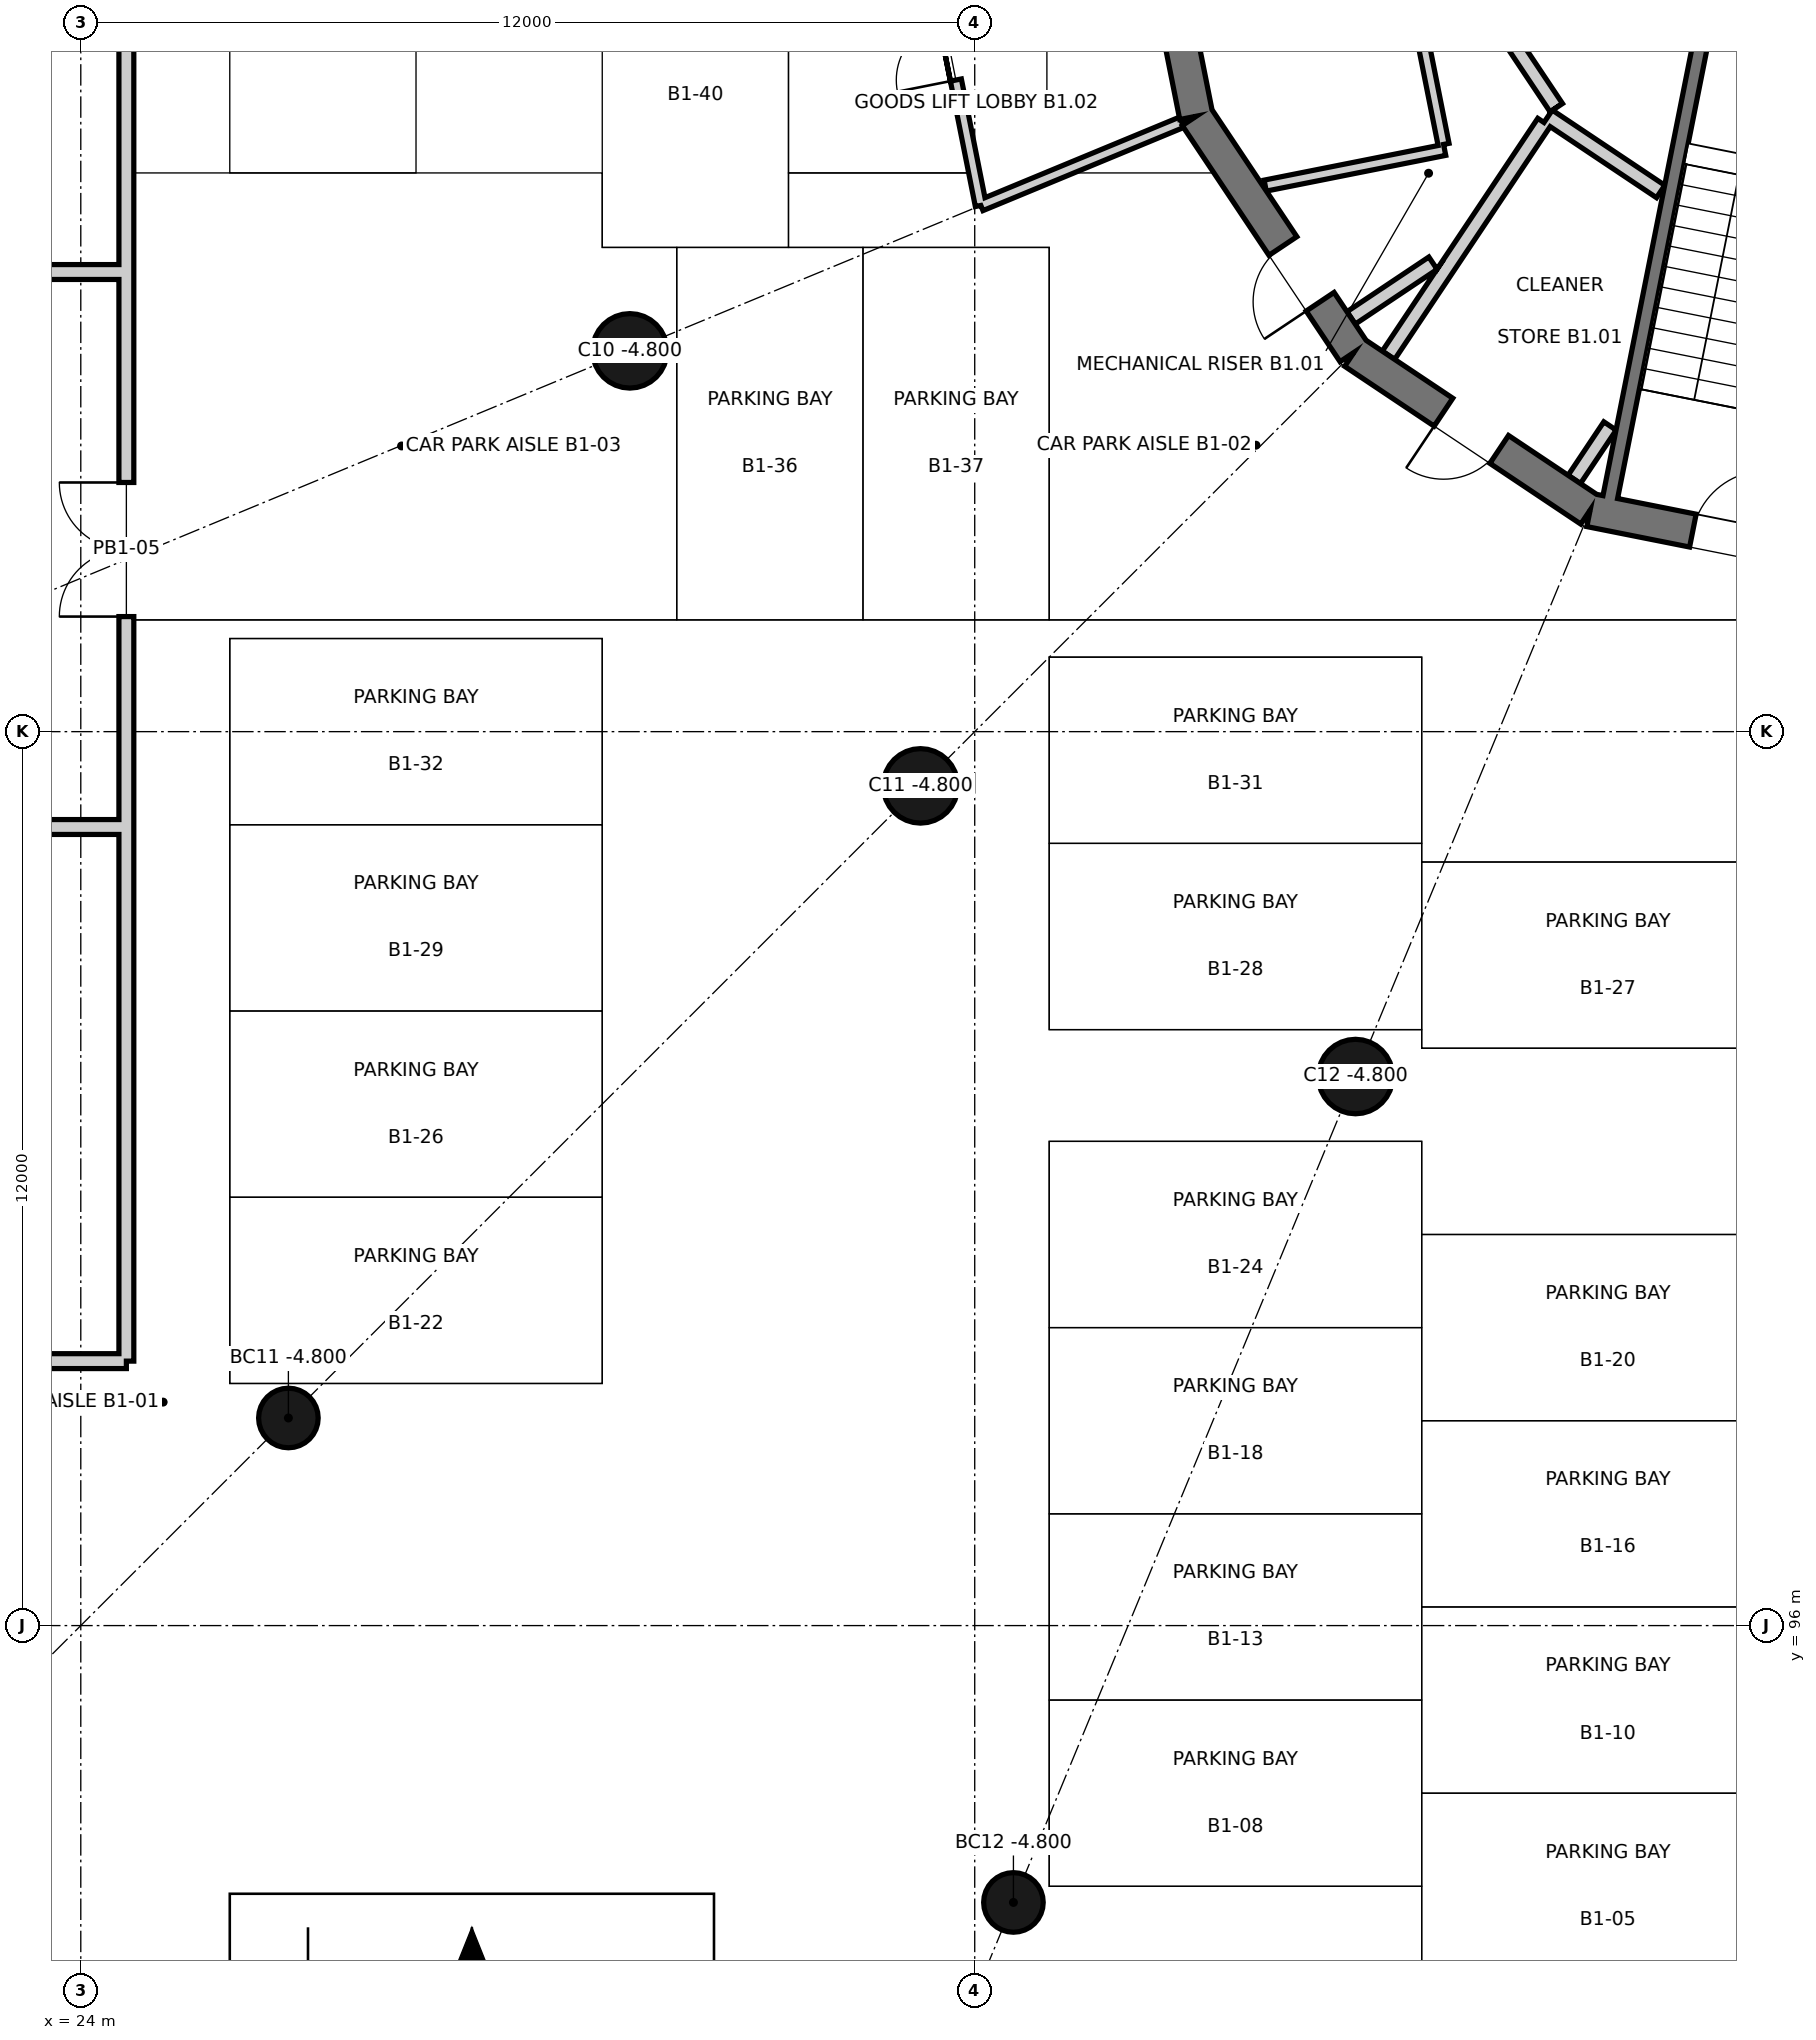
"""IFC4 building model, lengths in metres.
Left out: names, types, materials, properties, quantities, classifications, styles, units other than length and angle.
Written with IfcOpenShell. Run it as: python <this file> out.ifc"""

import sys

from ifc_helpers import new_model, si_unit, direction, frame, frame_2d, origin, origin_2d, place, context, subcontext, project, spatial, polyline, rectangle, circle, outline, extrude, element, fill, save


model = new_model("IFC4")
c1 = context("Model", 3, precision=1e-05, world=origin(), true_north=direction((0.0, 1.0)))
c2 = subcontext(c1, "Body", "Model", "MODEL_VIEW")
j1 = project(units=[si_unit("LENGTHUNIT", "METRE"), si_unit("PLANEANGLEUNIT", "RADIAN")], contexts=[c1])
p1 = place(None, origin())
s1 = spatial("IfcSite", under=j1, at=p1, CompositionType="ELEMENT")
p2 = place(p1, origin())
s2 = spatial("IfcBuilding", under=s1, at=p2, CompositionType="ELEMENT")
p3 = place(p2, frame((0.0, 0.0, -4.2)))
s3 = spatial("IfcBuildingStorey", under=s2, at=p3, CompositionType="ELEMENT", Elevation=-4.2)
p4 = place(p3, frame((38.229, 120.0, -0.6), z_axis=(0.0, 0.0, 1.0), x_axis=(0.195069197673, -0.98078948206, 0.0)))
e1 = element("IfcWall", 1, at=p4, inside=s3, PredefinedType="SHEAR", context=c2, shape_type="SweptSolid", body=[
    extrude(outline(polyline([(-0.045, -0.225), (3.857, -0.225), (3.768, 0.225), (0.045, 0.225), (-0.045, -0.225)])), origin(), (0.0, 0.0, 1.0), 4.8),
])
p5 = place(p4, frame((1.095, 0.0, 0.6)))
e2 = element("IfcOpeningElement", 2, at=p5, cuts=e1, PredefinedType="OPENING", context=c2, shape_type="SweptSolid", body=[
    extrude(rectangle(XDim=1.6, YDim=2.1, at=frame_2d((0.8, 1.05))), frame((0.0, 0.235, 0.0), z_axis=(0.0, -1.0, 0.0), x_axis=(1.0, 0.0, 0.0)), (0.0, 0.0, 1.0), 0.47),
])
p6 = place(p3, frame((38.973, 116.261, -0.6), z_axis=(0.0, 0.0, 1.0), x_axis=(0.555542277102, -0.83148829117, 0.0)))
e3 = element("IfcWall", 3, at=p6, inside=s3, PredefinedType="SHEAR", context=c2, shape_type="SweptSolid", body=[
    extrude(outline(polyline([(-0.045, -0.225), (3.857, -0.225), (3.768, 0.225), (0.045, 0.225), (-0.045, -0.225)])), origin(), (0.0, 0.0, 1.0), 4.8),
])
p7 = place(p6, frame((2.095, 0.0, 0.6)))
e4 = element("IfcOpeningElement", 4, at=p7, cuts=e3, PredefinedType="OPENING", context=c2, shape_type="SweptSolid", body=[
    extrude(rectangle(XDim=0.9, YDim=2.1, at=frame_2d((0.45, 1.05))), frame((0.0, 0.235, 0.0), z_axis=(0.0, -1.0, 0.0), x_axis=(1.0, 0.0, 0.0)), (0.0, 0.0, 1.0), 0.47),
])
p8 = place(p3, frame((41.091, 113.091, -0.6), z_axis=(0.0, 0.0, 1.0), x_axis=(0.83148829117, -0.555542277102, 0.0)))
e5 = element("IfcWall", 5, at=p8, inside=s3, PredefinedType="SHEAR", context=c2, shape_type="SweptSolid", body=[
    extrude(outline(polyline([(-0.045, -0.225), (3.857, -0.225), (3.768, 0.225), (0.045, 0.225), (-0.045, -0.225)])), origin(), (0.0, 0.0, 1.0), 4.8),
])
p9 = place(p8, frame((1.445, 0.0, 0.6)))
e6 = element("IfcOpeningElement", 6, at=p9, cuts=e5, PredefinedType="OPENING", context=c2, shape_type="SweptSolid", body=[
    extrude(rectangle(XDim=0.9, YDim=2.1, at=frame_2d((0.45, 1.05))), frame((0.0, 0.235, 0.0), z_axis=(0.0, -1.0, 0.0), x_axis=(1.0, 0.0, 0.0)), (0.0, 0.0, 1.0), 0.47),
])
p10 = place(p3, frame((44.261, 110.973, -0.6), z_axis=(0.0, 0.0, 1.0), x_axis=(0.98078948206, -0.195069197673, 0.0)))
e7 = element("IfcWall", 7, at=p10, inside=s3, PredefinedType="SHEAR", context=c2, shape_type="SweptSolid", body=[
    extrude(outline(polyline([(-0.045, -0.225), (3.857, -0.225), (3.768, 0.225), (0.045, 0.225), (-0.045, -0.225)])), origin(), (0.0, 0.0, 1.0), 4.8),
])
p11 = place(p10, frame((1.406, 0.0, 0.6)))
e8 = element("IfcOpeningElement", 8, at=p11, cuts=e7, PredefinedType="OPENING", context=c2, shape_type="SweptSolid", body=[
    extrude(rectangle(XDim=1.0, YDim=2.1, at=frame_2d((0.5, 1.05))), frame((0.0, 0.235, 0.0), z_axis=(0.0, -1.0, 0.0), x_axis=(1.0, 0.0, 0.0)), (0.0, 0.0, 1.0), 0.47),
])
p12 = place(p3, frame((46.053, 118.799, -0.6), z_axis=(0.0, 0.0, 1.0), x_axis=(-0.195092759861, -0.980784795483, 0.0)))
e9 = element("IfcWall", 9, at=p12, inside=s3, PredefinedType="SHEAR", context=c2, shape_type="SweptSolid", body=[
    extrude(rectangle(XDim=7.8, YDim=0.2, at=frame_2d((3.9, 0.0))), origin(), (0.0, 0.0, 1.0), 4.8),
])
for number, where, z_axis, x_axis in (
    (10, (31.37, 113.112, -0.6), (0.0, 0.0, 1.0), (1.0, 0.0, 0.0)),
    (11, (35.272, 107.272, -0.6), (0.0, 0.0, 1.0), (1.0, 0.0, 0.0)),
    (12, (41.112, 103.37, -0.6), (0.0, 0.0, 1.0), (1.0, 0.0, 0.0)),
):
    element("IfcColumn", number, at=place(p3, frame(where, z_axis=z_axis, x_axis=x_axis)), inside=s3, PredefinedType="COLUMN", context=c2, shape_type="SweptSolid", body=[
        extrude(circle(Radius=0.5, at=origin_2d()), origin(), (0.0, 0.0, 1.0), 4.8),
    ])
for number, where, z_axis, x_axis in (
    (13, (26.787, 98.787, -0.6), (0.0, 0.0, 1.0), (1.0, 0.0, 0.0)),
    (14, (36.52, 92.284, -0.6), (0.0, 0.0, 1.0), (1.0, 0.0, 0.0)),
):
    element("IfcColumn", number, at=place(p3, frame(where, z_axis=z_axis, x_axis=x_axis)), inside=s3, PredefinedType="COLUMN", context=c2, shape_type="SweptSolid", body=[
        extrude(circle(Radius=0.4, at=origin_2d()), origin(), (0.0, 0.0, 1.0), 4.35),
    ])
p13 = place(p3, frame((39.899, 115.33, 0.0), z_axis=(0.0, 0.0, 1.0), x_axis=(0.980782755583, 0.195103014715, 0.0)))
e15 = element("IfcWall", 15, at=p13, inside=s3, PredefinedType="PARTITIONING", context=c2, shape_type="SweptSolid", body=[
    extrude(rectangle(XDim=2.456, YDim=0.15, at=frame_2d((1.228, 0.0))), origin(), (0.0, 0.0, 1.0), 3.85),
])
p14 = place(p3, frame((42.294, 115.883, 0.0), z_axis=(0.0, 0.0, 1.0), x_axis=(-0.195163043227, 0.980770812452, 0.0)))
e16 = element("IfcWall", 16, at=p14, inside=s3, PredefinedType="PARTITIONING", context=c2, shape_type="SweptSolid", body=[
    extrude(rectangle(XDim=1.675, YDim=0.15, at=frame_2d((0.837, 0.0))), origin(), (0.0, 0.0, 1.0), 3.85),
])
p15 = place(p3, frame((43.697, 116.26, 0.0), z_axis=(0.0, 0.0, 1.0), x_axis=(0.831408849916, -0.555661159593, 0.0)))
e17 = element("IfcWall", 17, at=p15, inside=s3, PredefinedType="SOLIDWALL", context=c2, shape_type="SweptSolid", body=[
    extrude(rectangle(XDim=1.817, YDim=0.2, at=frame_2d((0.908, 0.0))), origin(), (0.0, 0.0, 1.0), 3.85),
])
p16 = place(p3, frame((44.528, 112.104, 0.0), z_axis=(0.0, 0.0, 1.0), x_axis=(-0.55561384329, -0.831440471197, 0.0)))
e18 = element("IfcWall", 18, at=p16, inside=s3, PredefinedType="SOLIDWALL", context=c2, shape_type="SweptSolid", body=[
    extrude(rectangle(XDim=0.863, YDim=0.2, at=frame_2d((0.432, 0.0))), origin(), (0.0, 0.0, 1.0), 3.85),
])
p17 = place(p3, frame((41.554, 113.052, 0.0), z_axis=(0.0, 0.0, 1.0), x_axis=(0.555524492638, 0.831500173228, 0.0)))
e19 = element("IfcWall", 19, at=p17, inside=s3, PredefinedType="SOLIDWALL", context=c2, shape_type="SweptSolid", body=[
    extrude(rectangle(XDim=3.758, YDim=0.2, at=frame_2d((1.879, 0.0))), origin(), (0.0, 0.0, 1.0), 3.85),
])
p18 = place(p3, frame((43.157, 117.348, 0.0), z_axis=(0.0, 0.0, 1.0), x_axis=(0.555615365777, -0.831439453786, 0.0)))
e20 = element("IfcWall", 20, at=p18, inside=s3, PredefinedType="SOLIDWALL", context=c2, shape_type="SweptSolid", body=[
    extrude(rectangle(XDim=1.169, YDim=0.2, at=frame_2d((0.584, 0.0))), origin(), (0.0, 0.0, 1.0), 3.85),
])
p19 = place(p3, frame((42.152, 114.288, 0.0), z_axis=(0.0, 0.0, 1.0), x_axis=(-0.83148157585, -0.555552327889, 0.0)))
e21 = element("IfcWall", 21, at=p19, inside=s3, PredefinedType="SOLIDWALL", context=c2, shape_type="SweptSolid", body=[
    extrude(rectangle(XDim=1.322, YDim=0.2, at=frame_2d((0.661, 0.0))), origin(), (0.0, 0.0, 1.0), 3.85),
])
p20 = place(p3, frame((24.517, 114.17, 0.0), z_axis=(0.0, 0.0, 1.0), x_axis=(-1.0, 0.0, 0.0)))
e22 = element("IfcWall", 22, at=p20, inside=s3, PredefinedType="SOLIDWALL", context=c2, shape_type="SweptSolid", body=[
    extrude(rectangle(XDim=16.765, YDim=0.2, at=frame_2d((8.383, 0.0))), origin(), (0.0, 0.0, 1.0), 3.75),
])
p21 = place(p3, frame((24.612, 128.05, 0.0), z_axis=(0.0, 0.0, 1.0), x_axis=(0.0, -1.0, 0.0)))
e23 = element("IfcWall", 23, at=p21, inside=s3, PredefinedType="SOLIDWALL", context=c2, shape_type="SweptSolid", body=[
    extrude(rectangle(XDim=13.88, YDim=0.2, at=frame_2d((6.94, 0.0))), origin(), (0.0, 0.0, 1.0), 3.75),
])
p22 = place(p21, frame((6.04, 0.0, 0.0)))
e24 = element("IfcOpeningElement", 24, at=p22, cuts=e23, PredefinedType="OPENING", context=c2, shape_type="SweptSolid", body=[
    extrude(rectangle(XDim=1.8, YDim=2.1, at=frame_2d((0.9, 1.05))), frame((0.0, 0.11, 0.0), z_axis=(0.0, -1.0, 0.0), x_axis=(1.0, 0.0, 0.0)), (0.0, 0.0, 1.0), 0.22),
])
p23 = place(p3, frame((24.517, 106.72, 0.0), z_axis=(0.0, 0.0, 1.0), x_axis=(-1.0, 0.0, 0.0)))
e25 = element("IfcWall", 25, at=p23, inside=s3, PredefinedType="SOLIDWALL", context=c2, shape_type="SweptSolid", body=[
    extrude(rectangle(XDim=15.283, YDim=0.2, at=frame_2d((7.642, 0.0))), origin(), (0.0, 0.0, 1.0), 3.75),
])
p24 = place(p3, frame((24.612, 114.17, 0.0), z_axis=(0.0, 0.0, 1.0), x_axis=(0.0, -1.0, 0.0)))
e26 = element("IfcWall", 26, at=p24, inside=s3, PredefinedType="SOLIDWALL", context=c2, shape_type="SweptSolid", body=[
    extrude(rectangle(XDim=7.45, YDim=0.2, at=frame_2d((3.725, 0.0))), origin(), (0.0, 0.0, 1.0), 3.75),
])
p25 = place(p24, frame((2.825, 0.0, 0.0)))
e27 = element("IfcOpeningElement", 27, at=p25, cuts=e26, PredefinedType="OPENING", context=c2, shape_type="SweptSolid", body=[
    extrude(rectangle(XDim=1.8, YDim=2.1, at=frame_2d((0.9, 1.05))), frame((0.0, 0.11, 0.0), z_axis=(0.0, -1.0, 0.0), x_axis=(1.0, 0.0, 0.0)), (0.0, 0.0, 1.0), 0.22),
])
p26 = place(p3, frame((24.612, 106.72, 0.0), z_axis=(0.0, 0.0, 1.0), x_axis=(0.0, -1.0, 0.0)))
e28 = element("IfcWall", 28, at=p26, inside=s3, PredefinedType="SOLIDWALL", context=c2, shape_type="SweptSolid", body=[
    extrude(rectangle(XDim=7.17, YDim=0.2, at=frame_2d((3.585, 0.0))), origin(), (0.0, 0.0, 1.0), 3.75),
])
p27 = place(p3, frame((24.612, 99.55, 0.0), z_axis=(0.0, 0.0, 1.0), x_axis=(-1.0, 0.0, 0.0)))
e29 = element("IfcWall", 29, at=p27, inside=s3, PredefinedType="SOLIDWALL", context=c2, shape_type="SweptSolid", body=[
    extrude(rectangle(XDim=11.788, YDim=0.2, at=frame_2d((5.894, 0.0))), origin(), (0.0, 0.0, 1.0), 3.75),
])
p28 = place(p27, frame((5.394, 0.0, 0.0)))
e30 = element("IfcOpeningElement", 30, at=p28, cuts=e29, PredefinedType="OPENING", context=c2, shape_type="SweptSolid", body=[
    extrude(rectangle(XDim=1.0, YDim=2.1, at=frame_2d((0.5, 1.05))), frame((0.0, 0.11, 0.0), z_axis=(0.0, -1.0, 0.0), x_axis=(1.0, 0.0, 0.0)), (0.0, 0.0, 1.0), 0.22),
])
p29 = place(p3, frame((38.78, 116.181, 0.0), z_axis=(0.0, 0.0, 1.0), x_axis=(-0.923881302106, -0.382679160157, 0.0)))
e31 = element("IfcWall", 31, at=p29, inside=s3, PredefinedType="PARTITIONING", context=c2, shape_type="SweptSolid", body=[
    extrude(rectangle(XDim=2.92, YDim=0.15, at=frame_2d((1.46, 0.0))), origin(), (0.0, 0.0, 1.0), 3.05),
])
p30 = place(p3, frame((36.082, 115.063, 0.0), z_axis=(0.0, 0.0, 1.0), x_axis=(-0.195089945547, 0.980785355287, 0.0)))
e32 = element("IfcWall", 32, at=p30, inside=s3, PredefinedType="PARTITIONING", context=c2, shape_type="SweptSolid", body=[
    extrude(rectangle(XDim=5.033, YDim=0.15, at=frame_2d((2.517, 0.0))), origin(), (0.0, 0.0, 1.0), 3.85),
])
p31 = place(p30, frame((1.717, 0.0, 0.0)))
e33 = element("IfcOpeningElement", 33, at=p31, cuts=e32, PredefinedType="OPENING", context=c2, shape_type="SweptSolid", body=[
    extrude(rectangle(XDim=1.6, YDim=2.1, at=frame_2d((0.8, 1.05))), frame((0.0, 0.085, 0.0), z_axis=(0.0, -1.0, 0.0), x_axis=(1.0, 0.0, 0.0)), (0.0, 0.0, 1.0), 0.17),
])
p32 = place(p11, origin())
e34 = element("IfcDoor", 34, at=p32, inside=s3, OperationType="SINGLE_SWING_RIGHT", PredefinedType="DOOR", context=c2, shape_type="SweptSolid", body=[
    extrude(rectangle(XDim=1.0, YDim=2.1, at=frame_2d((0.5, 1.05))), frame((0.0, 0.025, 0.0), z_axis=(0.0, -1.0, 0.0), x_axis=(1.0, 0.0, 0.0)), (0.0, 0.0, 1.0), 0.05),
])
fill(e8, e34)
p33 = place(p9, frame((0.9, 0.0, 0.0), z_axis=(0.0, 0.0, 1.0), x_axis=(-1.0, 0.0, 0.0)))
e35 = element("IfcDoor", 35, at=p33, inside=s3, OperationType="SINGLE_SWING_RIGHT", PredefinedType="DOOR", context=c2, shape_type="SweptSolid", body=[
    extrude(rectangle(XDim=0.9, YDim=2.1, at=frame_2d((0.45, 1.05))), frame((0.0, 0.025, 0.0), z_axis=(0.0, -1.0, 0.0), x_axis=(1.0, 0.0, 0.0)), (0.0, 0.0, 1.0), 0.05),
])
fill(e6, e35)
p34 = place(p7, frame((0.9, 0.0, 0.0), z_axis=(0.0, 0.0, 1.0), x_axis=(-1.0, 0.0, 0.0)))
e36 = element("IfcDoor", 36, at=p34, inside=s3, OperationType="SINGLE_SWING_LEFT", PredefinedType="DOOR", context=c2, shape_type="SweptSolid", body=[
    extrude(rectangle(XDim=0.9, YDim=2.1, at=frame_2d((0.45, 1.05))), frame((0.0, 0.025, 0.0), z_axis=(0.0, -1.0, 0.0), x_axis=(1.0, 0.0, 0.0)), (0.0, 0.0, 1.0), 0.05),
])
fill(e4, e36)
p35 = place(p25, frame((1.8, 0.0, 0.0), z_axis=(0.0, 0.0, 1.0), x_axis=(-1.0, 0.0, 0.0)))
e37 = element("IfcDoor", 37, at=p35, inside=s3, OperationType="DOUBLE_DOOR_SINGLE_SWING", PredefinedType="DOOR", context=c2, shape_type="SweptSolid", body=[
    extrude(rectangle(XDim=1.8, YDim=2.1, at=frame_2d((0.9, 1.05))), frame((0.0, 0.025, 0.0), z_axis=(0.0, -1.0, 0.0), x_axis=(1.0, 0.0, 0.0)), (0.0, 0.0, 1.0), 0.05),
])
fill(e27, e37)
p36 = place(p31, origin())
e38 = element("IfcDoor", 38, at=p36, inside=s3, OperationType="DOUBLE_DOOR_SINGLE_SWING", PredefinedType="DOOR", context=c2, shape_type="SweptSolid", body=[
    extrude(rectangle(XDim=1.6, YDim=2.1, at=frame_2d((0.8, 1.05))), frame((0.0, 0.025, 0.0), z_axis=(0.0, -1.0, 0.0), x_axis=(1.0, 0.0, 0.0)), (0.0, 0.0, 1.0), 0.05),
])
fill(e33, e38)
save(model, sys.argv[1])
